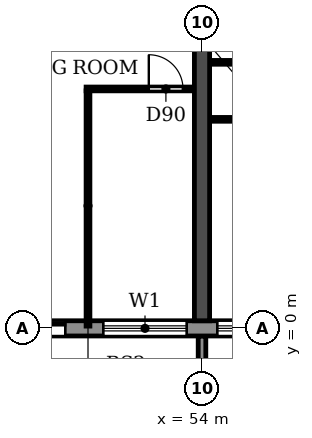
"""IFC4 building model, lengths in metres.
Left out: names, types, materials, properties, quantities, classifications, styles, units other than length and angle.
Written with IfcOpenShell. Run it as: python <this file> out.ifc"""

import sys

from ifc_helpers import new_model, si_unit, direction, frame, frame_2d, origin, place, context, subcontext, project, spatial, polyline, rectangle, outline, extrude, source, transform, mapped, element, fill, save


model = new_model("IFC4")
c1 = context("Model", 3, precision=1e-05, world=origin(), true_north=direction((0.0, 1.0)))
c2 = subcontext(c1, "Body", "Model", "MODEL_VIEW")
j1 = project(units=[si_unit("LENGTHUNIT", "METRE"), si_unit("PLANEANGLEUNIT", "RADIAN")], contexts=[c1])
p1 = place(None, origin())
s1 = spatial("IfcSite", under=j1, at=p1, CompositionType="ELEMENT")
p2 = place(p1, origin())
s2 = spatial("IfcBuilding", under=s1, at=p2, CompositionType="ELEMENT")
p3 = place(p2, frame((0.0, 0.0, 26.7)))
s3 = spatial("IfcBuildingStorey", under=s2, at=p3, CompositionType="ELEMENT", Elevation=26.7)
p4 = place(p3, frame((54.0, 0.2, 0.0), z_axis=(0.0, 0.0, 1.0), x_axis=(0.0, 1.0, 0.0)))
e1 = element("IfcWall", 1, at=p4, inside=s3, PredefinedType="SHEAR", context=c2, shape_type="SweptSolid", body=[
    extrude(rectangle(XDim=11.65, YDim=0.4, at=frame_2d((5.825, 0.0))), origin(), (0.0, 0.0, 1.0), 3.05),
])
p5 = place(p3, frame((4.683, 0.0, 0.0), z_axis=(0.0, 0.0, 1.0), x_axis=(1.0, 0.0, 0.0)))
e2 = element("IfcWall", 2, at=p5, inside=s3, PredefinedType="STANDARD", context=c2, shape_type="SweptSolid", body=[
    extrude(rectangle(XDim=92.634, YDim=0.4, at=frame_2d((46.317, 0.0))), origin(), (0.0, 0.0, 1.0), 3.05),
])
p6 = place(p5, frame((1.717, 0.0, 0.9)))
e3 = element("IfcOpeningElement", 3, at=p6, cuts=e2, PredefinedType="OPENING", context=c2, shape_type="SweptSolid", body=[
    extrude(rectangle(XDim=2.2, YDim=1.5, at=frame_2d((1.1, 0.75))), frame((0.0, 0.21, 0.0), z_axis=(0.0, -1.0, 0.0), x_axis=(1.0, 0.0, 0.0)), (0.0, 0.0, 1.0), 0.42),
])
p7 = place(p5, frame((4.717, 0.0, 0.9)))
e4 = element("IfcOpeningElement", 4, at=p7, cuts=e2, PredefinedType="OPENING", context=c2, shape_type="SweptSolid", body=[
    extrude(rectangle(XDim=2.2, YDim=1.5, at=frame_2d((1.1, 0.75))), frame((0.0, 0.21, 0.0), z_axis=(0.0, -1.0, 0.0), x_axis=(1.0, 0.0, 0.0)), (0.0, 0.0, 1.0), 0.42),
])
p8 = place(p5, frame((7.717, 0.0, 0.9)))
e5 = element("IfcOpeningElement", 5, at=p8, cuts=e2, PredefinedType="OPENING", context=c2, shape_type="SweptSolid", body=[
    extrude(rectangle(XDim=2.2, YDim=1.5, at=frame_2d((1.1, 0.75))), frame((0.0, 0.21, 0.0), z_axis=(0.0, -1.0, 0.0), x_axis=(1.0, 0.0, 0.0)), (0.0, 0.0, 1.0), 0.42),
])
p9 = place(p5, frame((10.717, 0.0, 0.9)))
e6 = element("IfcOpeningElement", 6, at=p9, cuts=e2, PredefinedType="OPENING", context=c2, shape_type="SweptSolid", body=[
    extrude(rectangle(XDim=2.2, YDim=1.5, at=frame_2d((1.1, 0.75))), frame((0.0, 0.21, 0.0), z_axis=(0.0, -1.0, 0.0), x_axis=(1.0, 0.0, 0.0)), (0.0, 0.0, 1.0), 0.42),
])
p10 = place(p5, frame((13.717, 0.0, 0.9)))
e7 = element("IfcOpeningElement", 7, at=p10, cuts=e2, PredefinedType="OPENING", context=c2, shape_type="SweptSolid", body=[
    extrude(rectangle(XDim=2.2, YDim=1.5, at=frame_2d((1.1, 0.75))), frame((0.0, 0.21, 0.0), z_axis=(0.0, -1.0, 0.0), x_axis=(1.0, 0.0, 0.0)), (0.0, 0.0, 1.0), 0.42),
])
p11 = place(p5, frame((16.717, 0.0, 0.9)))
e8 = element("IfcOpeningElement", 8, at=p11, cuts=e2, PredefinedType="OPENING", context=c2, shape_type="SweptSolid", body=[
    extrude(rectangle(XDim=2.2, YDim=1.5, at=frame_2d((1.1, 0.75))), frame((0.0, 0.21, 0.0), z_axis=(0.0, -1.0, 0.0), x_axis=(1.0, 0.0, 0.0)), (0.0, 0.0, 1.0), 0.42),
])
p12 = place(p5, frame((19.917, 0.0, 0.0)))
e9 = element("IfcOpeningElement", 9, at=p12, cuts=e2, PredefinedType="OPENING", context=c2, shape_type="SweptSolid", body=[
    extrude(rectangle(XDim=1.8, YDim=2.4, at=frame_2d((0.9, 1.2))), frame((0.0, 0.21, 0.0), z_axis=(0.0, -1.0, 0.0), x_axis=(1.0, 0.0, 0.0)), (0.0, 0.0, 1.0), 0.42),
])
p13 = place(p5, frame((22.717, 0.0, 0.9)))
e10 = element("IfcOpeningElement", 10, at=p13, cuts=e2, PredefinedType="OPENING", context=c2, shape_type="SweptSolid", body=[
    extrude(rectangle(XDim=2.2, YDim=1.5, at=frame_2d((1.1, 0.75))), frame((0.0, 0.21, 0.0), z_axis=(0.0, -1.0, 0.0), x_axis=(1.0, 0.0, 0.0)), (0.0, 0.0, 1.0), 0.42),
])
p14 = place(p5, frame((25.717, 0.0, 0.9)))
e11 = element("IfcOpeningElement", 11, at=p14, cuts=e2, PredefinedType="OPENING", context=c2, shape_type="SweptSolid", body=[
    extrude(rectangle(XDim=2.2, YDim=1.5, at=frame_2d((1.1, 0.75))), frame((0.0, 0.21, 0.0), z_axis=(0.0, -1.0, 0.0), x_axis=(1.0, 0.0, 0.0)), (0.0, 0.0, 1.0), 0.42),
])
p15 = place(p5, frame((28.717, 0.0, 0.9)))
e12 = element("IfcOpeningElement", 12, at=p15, cuts=e2, PredefinedType="OPENING", context=c2, shape_type="SweptSolid", body=[
    extrude(rectangle(XDim=2.2, YDim=1.5, at=frame_2d((1.1, 0.75))), frame((0.0, 0.21, 0.0), z_axis=(0.0, -1.0, 0.0), x_axis=(1.0, 0.0, 0.0)), (0.0, 0.0, 1.0), 0.42),
])
p16 = place(p5, frame((31.917, 0.0, 0.0)))
e13 = element("IfcOpeningElement", 13, at=p16, cuts=e2, PredefinedType="OPENING", context=c2, shape_type="SweptSolid", body=[
    extrude(rectangle(XDim=1.8, YDim=2.4, at=frame_2d((0.9, 1.2))), frame((0.0, 0.21, 0.0), z_axis=(0.0, -1.0, 0.0), x_axis=(1.0, 0.0, 0.0)), (0.0, 0.0, 1.0), 0.42),
])
p17 = place(p5, frame((34.717, 0.0, 0.9)))
e14 = element("IfcOpeningElement", 14, at=p17, cuts=e2, PredefinedType="OPENING", context=c2, shape_type="SweptSolid", body=[
    extrude(rectangle(XDim=2.2, YDim=1.5, at=frame_2d((1.1, 0.75))), frame((0.0, 0.21, 0.0), z_axis=(0.0, -1.0, 0.0), x_axis=(1.0, 0.0, 0.0)), (0.0, 0.0, 1.0), 0.42),
])
p18 = place(p5, frame((37.717, 0.0, 0.9)))
e15 = element("IfcOpeningElement", 15, at=p18, cuts=e2, PredefinedType="OPENING", context=c2, shape_type="SweptSolid", body=[
    extrude(rectangle(XDim=2.2, YDim=1.5, at=frame_2d((1.1, 0.75))), frame((0.0, 0.21, 0.0), z_axis=(0.0, -1.0, 0.0), x_axis=(1.0, 0.0, 0.0)), (0.0, 0.0, 1.0), 0.42),
])
p19 = place(p5, frame((40.717, 0.0, 0.9)))
e16 = element("IfcOpeningElement", 16, at=p19, cuts=e2, PredefinedType="OPENING", context=c2, shape_type="SweptSolid", body=[
    extrude(rectangle(XDim=2.2, YDim=1.5, at=frame_2d((1.1, 0.75))), frame((0.0, 0.21, 0.0), z_axis=(0.0, -1.0, 0.0), x_axis=(1.0, 0.0, 0.0)), (0.0, 0.0, 1.0), 0.42),
])
p20 = place(p5, frame((43.917, 0.0, 0.0)))
e17 = element("IfcOpeningElement", 17, at=p20, cuts=e2, PredefinedType="OPENING", context=c2, shape_type="SweptSolid", body=[
    extrude(rectangle(XDim=1.8, YDim=2.4, at=frame_2d((0.9, 1.2))), frame((0.0, 0.21, 0.0), z_axis=(0.0, -1.0, 0.0), x_axis=(1.0, 0.0, 0.0)), (0.0, 0.0, 1.0), 0.42),
])
p21 = place(p5, frame((46.717, 0.0, 0.9)))
e18 = element("IfcOpeningElement", 18, at=p21, cuts=e2, PredefinedType="OPENING", context=c2, shape_type="SweptSolid", body=[
    extrude(rectangle(XDim=2.2, YDim=1.5, at=frame_2d((1.1, 0.75))), frame((0.0, 0.21, 0.0), z_axis=(0.0, -1.0, 0.0), x_axis=(1.0, 0.0, 0.0)), (0.0, 0.0, 1.0), 0.42),
])
p22 = place(p5, frame((49.717, 0.0, 0.9)))
e19 = element("IfcOpeningElement", 19, at=p22, cuts=e2, PredefinedType="OPENING", context=c2, shape_type="SweptSolid", body=[
    extrude(rectangle(XDim=2.2, YDim=1.5, at=frame_2d((1.1, 0.75))), frame((0.0, 0.21, 0.0), z_axis=(0.0, -1.0, 0.0), x_axis=(1.0, 0.0, 0.0)), (0.0, 0.0, 1.0), 0.42),
])
p23 = place(p5, frame((52.717, 0.0, 0.9)))
e20 = element("IfcOpeningElement", 20, at=p23, cuts=e2, PredefinedType="OPENING", context=c2, shape_type="SweptSolid", body=[
    extrude(rectangle(XDim=2.2, YDim=1.5, at=frame_2d((1.1, 0.75))), frame((0.0, 0.21, 0.0), z_axis=(0.0, -1.0, 0.0), x_axis=(1.0, 0.0, 0.0)), (0.0, 0.0, 1.0), 0.42),
])
p24 = place(p5, frame((55.717, 0.0, 0.9)))
e21 = element("IfcOpeningElement", 21, at=p24, cuts=e2, PredefinedType="OPENING", context=c2, shape_type="SweptSolid", body=[
    extrude(rectangle(XDim=2.2, YDim=1.5, at=frame_2d((1.1, 0.75))), frame((0.0, 0.21, 0.0), z_axis=(0.0, -1.0, 0.0), x_axis=(1.0, 0.0, 0.0)), (0.0, 0.0, 1.0), 0.42),
])
p25 = place(p5, frame((58.917, 0.0, 0.0)))
e22 = element("IfcOpeningElement", 22, at=p25, cuts=e2, PredefinedType="OPENING", context=c2, shape_type="SweptSolid", body=[
    extrude(rectangle(XDim=1.8, YDim=2.4, at=frame_2d((0.9, 1.2))), frame((0.0, 0.21, 0.0), z_axis=(0.0, -1.0, 0.0), x_axis=(1.0, 0.0, 0.0)), (0.0, 0.0, 1.0), 0.42),
])
p26 = place(p5, frame((61.717, 0.0, 0.9)))
e23 = element("IfcOpeningElement", 23, at=p26, cuts=e2, PredefinedType="OPENING", context=c2, shape_type="SweptSolid", body=[
    extrude(rectangle(XDim=2.2, YDim=1.5, at=frame_2d((1.1, 0.75))), frame((0.0, 0.21, 0.0), z_axis=(0.0, -1.0, 0.0), x_axis=(1.0, 0.0, 0.0)), (0.0, 0.0, 1.0), 0.42),
])
p27 = place(p5, frame((64.717, 0.0, 0.9)))
e24 = element("IfcOpeningElement", 24, at=p27, cuts=e2, PredefinedType="OPENING", context=c2, shape_type="SweptSolid", body=[
    extrude(rectangle(XDim=2.2, YDim=1.5, at=frame_2d((1.1, 0.75))), frame((0.0, 0.21, 0.0), z_axis=(0.0, -1.0, 0.0), x_axis=(1.0, 0.0, 0.0)), (0.0, 0.0, 1.0), 0.42),
])
p28 = place(p5, frame((67.717, 0.0, 0.9)))
e25 = element("IfcOpeningElement", 25, at=p28, cuts=e2, PredefinedType="OPENING", context=c2, shape_type="SweptSolid", body=[
    extrude(rectangle(XDim=2.2, YDim=1.5, at=frame_2d((1.1, 0.75))), frame((0.0, 0.21, 0.0), z_axis=(0.0, -1.0, 0.0), x_axis=(1.0, 0.0, 0.0)), (0.0, 0.0, 1.0), 0.42),
])
p29 = place(p5, frame((70.917, 0.0, 0.0)))
e26 = element("IfcOpeningElement", 26, at=p29, cuts=e2, PredefinedType="OPENING", context=c2, shape_type="SweptSolid", body=[
    extrude(rectangle(XDim=1.8, YDim=2.4, at=frame_2d((0.9, 1.2))), frame((0.0, 0.21, 0.0), z_axis=(0.0, -1.0, 0.0), x_axis=(1.0, 0.0, 0.0)), (0.0, 0.0, 1.0), 0.42),
])
p30 = place(p5, frame((73.717, 0.0, 0.9)))
e27 = element("IfcOpeningElement", 27, at=p30, cuts=e2, PredefinedType="OPENING", context=c2, shape_type="SweptSolid", body=[
    extrude(rectangle(XDim=2.2, YDim=1.5, at=frame_2d((1.1, 0.75))), frame((0.0, 0.21, 0.0), z_axis=(0.0, -1.0, 0.0), x_axis=(1.0, 0.0, 0.0)), (0.0, 0.0, 1.0), 0.42),
])
p31 = place(p5, frame((76.717, 0.0, 0.9)))
e28 = element("IfcOpeningElement", 28, at=p31, cuts=e2, PredefinedType="OPENING", context=c2, shape_type="SweptSolid", body=[
    extrude(rectangle(XDim=2.2, YDim=1.5, at=frame_2d((1.1, 0.75))), frame((0.0, 0.21, 0.0), z_axis=(0.0, -1.0, 0.0), x_axis=(1.0, 0.0, 0.0)), (0.0, 0.0, 1.0), 0.42),
])
p32 = place(p5, frame((79.717, 0.0, 0.9)))
e29 = element("IfcOpeningElement", 29, at=p32, cuts=e2, PredefinedType="OPENING", context=c2, shape_type="SweptSolid", body=[
    extrude(rectangle(XDim=2.2, YDim=1.5, at=frame_2d((1.1, 0.75))), frame((0.0, 0.21, 0.0), z_axis=(0.0, -1.0, 0.0), x_axis=(1.0, 0.0, 0.0)), (0.0, 0.0, 1.0), 0.42),
])
p33 = place(p5, frame((82.717, 0.0, 0.9)))
e30 = element("IfcOpeningElement", 30, at=p33, cuts=e2, PredefinedType="OPENING", context=c2, shape_type="SweptSolid", body=[
    extrude(rectangle(XDim=2.2, YDim=1.5, at=frame_2d((1.1, 0.75))), frame((0.0, 0.21, 0.0), z_axis=(0.0, -1.0, 0.0), x_axis=(1.0, 0.0, 0.0)), (0.0, 0.0, 1.0), 0.42),
])
p34 = place(p5, frame((85.717, 0.0, 0.9)))
e31 = element("IfcOpeningElement", 31, at=p34, cuts=e2, PredefinedType="OPENING", context=c2, shape_type="SweptSolid", body=[
    extrude(rectangle(XDim=2.2, YDim=1.5, at=frame_2d((1.1, 0.75))), frame((0.0, 0.21, 0.0), z_axis=(0.0, -1.0, 0.0), x_axis=(1.0, 0.0, 0.0)), (0.0, 0.0, 1.0), 0.42),
])
p35 = place(p5, frame((88.717, 0.0, 0.9)))
e32 = element("IfcOpeningElement", 32, at=p35, cuts=e2, PredefinedType="OPENING", context=c2, shape_type="SweptSolid", body=[
    extrude(rectangle(XDim=2.2, YDim=1.5, at=frame_2d((1.1, 0.75))), frame((0.0, 0.21, 0.0), z_axis=(0.0, -1.0, 0.0), x_axis=(1.0, 0.0, 0.0)), (0.0, 0.0, 1.0), 0.42),
])
m1 = source(origin(), c2, "Body", "SweptSolid", [
    extrude(outline(polyline([(0.0, 0.0), (0.2, 0.0), (0.2, 1.65), (0.0, 1.65), (0.0, 0.0)])), origin(), (0.0, 0.0, 1.0), 3.1),
])
p36 = place(p3, frame((53.9, -1.85, 0.0)))
e33 = element("IfcWall", 33, at=p36, inside=s3, PredefinedType="STANDARD", context=c2, shape_type="MappedRepresentation", body=[
    mapped(m1, transform((0.0, 0.0, 0.0))),
])
p37 = place(p3, frame((54.21, 5.5, 0.0), z_axis=(0.0, 0.0, 1.0), x_axis=(1.0, 0.0, 0.0)))
e34 = element("IfcWall", 34, at=p37, inside=s3, PredefinedType="PARTITIONING", context=c2, shape_type="SweptSolid", body=[
    extrude(rectangle(XDim=5.58, YDim=0.1, at=frame_2d((2.79, 0.0))), origin(), (0.0, 0.0, 1.0), 3.05),
])
p38 = place(p37, frame((1.39, 0.0, 0.0)))
e35 = element("IfcOpeningElement", 35, at=p38, cuts=e34, PredefinedType="OPENING", context=c2, shape_type="SweptSolid", body=[
    extrude(rectangle(XDim=0.9, YDim=2.1, at=frame_2d((0.45, 1.05))), frame((0.0, 0.06, 0.0), z_axis=(0.0, -1.0, 0.0), x_axis=(1.0, 0.0, 0.0)), (0.0, 0.0, 1.0), 0.12),
])
p39 = place(p37, frame((3.29, 0.0, 0.0)))
e36 = element("IfcOpeningElement", 36, at=p39, cuts=e34, PredefinedType="OPENING", context=c2, shape_type="SweptSolid", body=[
    extrude(rectangle(XDim=0.9, YDim=2.1, at=frame_2d((0.45, 1.05))), frame((0.0, 0.06, 0.0), z_axis=(0.0, -1.0, 0.0), x_axis=(1.0, 0.0, 0.0)), (0.0, 0.0, 1.0), 0.12),
])
p40 = place(p3, frame((50.95, 6.3, 0.0), z_axis=(0.0, 0.0, 1.0), x_axis=(1.0, 0.0, 0.0)))
e37 = element("IfcWall", 37, at=p40, inside=s3, PredefinedType="PARTITIONING", context=c2, shape_type="SweptSolid", body=[
    extrude(rectangle(XDim=2.84, YDim=0.1, at=frame_2d((1.42, 0.0))), origin(), (0.0, 0.0, 1.0), 3.05),
])
p41 = place(p40, frame((1.65, 0.0, 0.0)))
e38 = element("IfcOpeningElement", 38, at=p41, cuts=e37, PredefinedType="OPENING", context=c2, shape_type="SweptSolid", body=[
    extrude(rectangle(XDim=0.9, YDim=2.1, at=frame_2d((0.45, 1.05))), frame((0.0, 0.06, 0.0), z_axis=(0.0, -1.0, 0.0), x_axis=(1.0, 0.0, 0.0)), (0.0, 0.0, 1.0), 0.12),
])
p42 = place(p3, frame((54.21, 7.0, 0.0), z_axis=(0.0, 0.0, 1.0), x_axis=(1.0, 0.0, 0.0)))
e39 = element("IfcWall", 39, at=p42, inside=s3, PredefinedType="PARTITIONING", context=c2, shape_type="SweptSolid", body=[
    extrude(rectangle(XDim=3.14, YDim=0.1, at=frame_2d((1.57, 0.0))), origin(), (0.0, 0.0, 1.0), 3.05),
])
p43 = place(p42, frame((1.04, 0.0, 0.0)))
e40 = element("IfcOpeningElement", 40, at=p43, cuts=e39, PredefinedType="OPENING", context=c2, shape_type="SweptSolid", body=[
    extrude(rectangle(XDim=0.8, YDim=2.1, at=frame_2d((0.4, 1.05))), frame((0.0, 0.06, 0.0), z_axis=(0.0, -1.0, 0.0), x_axis=(1.0, 0.0, 0.0)), (0.0, 0.0, 1.0), 0.12),
])
p44 = place(p3, frame((51.0, 0.06, 0.0), z_axis=(0.0, 0.0, 1.0), x_axis=(0.0, 1.0, 0.0)))
e41 = element("IfcWall", 41, at=p44, inside=s3, PredefinedType="PARTITIONING", context=c2, shape_type="SweptSolid", body=[
    extrude(rectangle(XDim=6.19, YDim=0.1, at=frame_2d((3.095, 0.0))), origin(), (0.0, 0.0, 1.0), 3.05),
])
p45 = place(p20, origin())
e42 = element("IfcDoor", 42, at=p45, inside=s3, OperationType="DOUBLE_DOOR_SLIDING", PredefinedType="DOOR", context=c2, shape_type="SweptSolid", body=[
    extrude(rectangle(XDim=1.8, YDim=2.4, at=frame_2d((0.9, 1.2))), frame((0.0, 0.025, 0.0), z_axis=(0.0, -1.0, 0.0), x_axis=(1.0, 0.0, 0.0)), (0.0, 0.0, 1.0), 0.05),
])
fill(e17, e42)
p46 = place(p21, origin())
e43 = element("IfcWindow", 43, at=p46, inside=s3, PartitioningType="DOUBLE_PANEL_HORIZONTAL", PredefinedType="WINDOW", context=c2, shape_type="SweptSolid", body=[
    extrude(rectangle(XDim=2.2, YDim=1.5, at=frame_2d((1.1, 0.75))), frame((0.0, 0.03, 0.0), z_axis=(0.0, -1.0, 0.0), x_axis=(1.0, 0.0, 0.0)), (0.0, 0.0, 1.0), 0.06),
])
fill(e18, e43)
p47 = place(p22, origin())
e44 = element("IfcWindow", 44, at=p47, inside=s3, PartitioningType="DOUBLE_PANEL_HORIZONTAL", PredefinedType="WINDOW", context=c2, shape_type="SweptSolid", body=[
    extrude(rectangle(XDim=2.2, YDim=1.5, at=frame_2d((1.1, 0.75))), frame((0.0, 0.03, 0.0), z_axis=(0.0, -1.0, 0.0), x_axis=(1.0, 0.0, 0.0)), (0.0, 0.0, 1.0), 0.06),
])
fill(e19, e44)
p48 = place(p41, origin())
e45 = element("IfcDoor", 45, at=p48, inside=s3, OperationType="SINGLE_SWING_LEFT", PredefinedType="DOOR", context=c2, shape_type="SweptSolid", body=[
    extrude(rectangle(XDim=0.9, YDim=2.1, at=frame_2d((0.45, 1.05))), frame((0.0, 0.025, 0.0), z_axis=(0.0, -1.0, 0.0), x_axis=(1.0, 0.0, 0.0)), (0.0, 0.0, 1.0), 0.05),
])
fill(e38, e45)
save(model, sys.argv[1])
